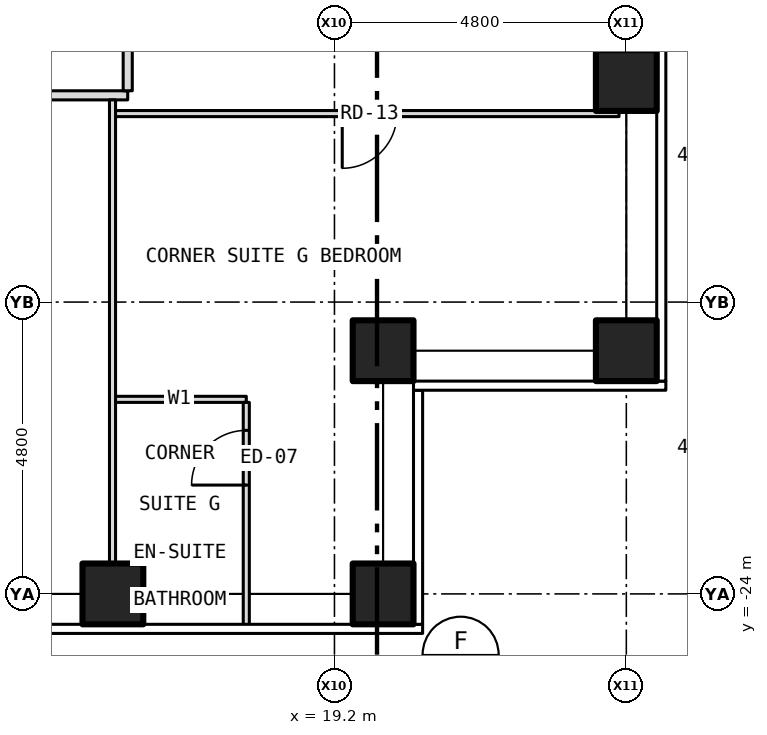
"""IFC4 building model, lengths in metres.
Left out: names, types, materials, properties, quantities, classifications, styles, units other than length and angle.
Written with IfcOpenShell. Run it as: python <this file> out.ifc"""

import sys

from ifc_helpers import new_model, si_unit, direction, frame, frame_2d, origin, origin_2d, place, context, subcontext, project, spatial, rectangle, hollow_rectangle, extrude, element, fill, save


model = new_model("IFC4")
c1 = context("Model", 3, precision=1e-05, world=origin(), true_north=direction((0.0, 1.0)))
c2 = subcontext(c1, "Body", "Model", "MODEL_VIEW")
j1 = project(units=[si_unit("LENGTHUNIT", "METRE"), si_unit("PLANEANGLEUNIT", "RADIAN")], contexts=[c1])
p1 = place(None, origin())
s1 = spatial("IfcSite", under=j1, at=p1, CompositionType="ELEMENT")
p2 = place(p1, origin())
s2 = spatial("IfcBuilding", under=s1, at=p2, CompositionType="ELEMENT")
p3 = place(p2, frame((0.0, 0.0, 70.5)))
s3 = spatial("IfcBuildingStorey", under=s2, at=p3, CompositionType="ELEMENT", Elevation=70.5)
for number, where, z_axis, x_axis in (
    (1, (15.556, -24.0, -0.15), (0.0, 0.0, 1.0), (1.0, 0.0, 0.0)),
    (2, (20.0, -24.0, -0.15), (0.0, 0.0, 1.0), (1.0, 0.0, 0.0)),
    (3, (24.0, -20.0, -0.15), (0.0, 0.0, 1.0), (1.0, 0.0, 0.0)),
    (4, (24.0, -15.556, -0.15), (0.0, 0.0, 1.0), (1.0, 0.0, 0.0)),
    (5, (20.0, -20.0, -0.15), (0.0, 0.0, 1.0), (1.0, 0.0, 0.0)),
):
    element("IfcColumn", number, at=place(p3, frame(where, z_axis=z_axis, x_axis=x_axis)), inside=s3, PredefinedType="COLUMN", context=c2, shape_type="SweptSolid", body=[
        extrude(hollow_rectangle(XDim=1.0, YDim=1.0, WallThickness=0.06, at=origin_2d()), origin(), (0.0, 0.0, 1.0), 3.5),
    ])
p4 = place(p3, frame((15.55, -20.8, 0.0), z_axis=(0.0, 0.0, 1.0), x_axis=(1.0, 0.0, 0.0)))
e6 = element("IfcWall", 6, at=p4, inside=s3, PredefinedType="PARTITIONING", context=c2, shape_type="SweptSolid", body=[
    extrude(rectangle(XDim=2.2, YDim=0.1, at=frame_2d((1.1, 0.0))), origin(), (0.0, 0.0, 1.0), 3.35),
])
p5 = place(p3, frame((15.55, -16.1, 0.0), z_axis=(0.0, 0.0, 1.0), x_axis=(1.0, 0.0, 0.0)))
e7 = element("IfcWall", 7, at=p5, inside=s3, PredefinedType="PARTITIONING", context=c2, shape_type="SweptSolid", body=[
    extrude(rectangle(XDim=8.33, YDim=0.1, at=frame_2d((4.165, 0.0))), origin(), (0.0, 0.0, 1.0), 3.35),
])
p6 = place(p5, frame((3.778, 0.0, 0.0)))
e8 = element("IfcOpeningElement", 8, at=p6, cuts=e7, PredefinedType="OPENING", context=c2, shape_type="SweptSolid", body=[
    extrude(rectangle(XDim=0.9, YDim=2.1, at=frame_2d((0.45, 1.05))), frame((0.0, 0.062, 0.0), z_axis=(0.0, -1.0, 0.0), x_axis=(1.0, 0.0, 0.0)), (0.0, 0.0, 1.0), 0.124),
])
p7 = place(p3, frame((9.15, -15.8, 0.0), z_axis=(0.0, 0.0, 1.0), x_axis=(1.0, 0.0, 0.0)))
e9 = element("IfcWall", 9, at=p7, inside=s3, PredefinedType="PARTITIONING", context=c2, shape_type="SweptSolid", body=[
    extrude(rectangle(XDim=6.65, YDim=0.15, at=frame_2d((3.325, 0.0))), origin(), (0.0, 0.0, 1.0), 3.35),
])
p8 = place(p7, frame((3.803, 0.0, 0.0)))
e10 = element("IfcOpeningElement", 10, at=p8, cuts=e9, PredefinedType="OPENING", context=c2, shape_type="SweptSolid", body=[
    extrude(rectangle(XDim=1.0, YDim=2.1, at=frame_2d((0.5, 1.05))), frame((0.0, 0.087, 0.0), z_axis=(0.0, -1.0, 0.0), x_axis=(1.0, 0.0, 0.0)), (0.0, 0.0, 1.0), 0.174),
])
p9 = place(p3, frame((15.55, -23.88, 0.0), z_axis=(0.0, 0.0, 1.0), x_axis=(0.0, 1.0, 0.0)))
e11 = element("IfcWall", 11, at=p9, inside=s3, PredefinedType="PARTITIONING", context=c2, shape_type="SweptSolid", body=[
    extrude(rectangle(XDim=8.005, YDim=0.1, at=frame_2d((4.002, 0.0))), origin(), (0.0, 0.0, 1.0), 3.35),
])
p10 = place(p3, frame((15.8, -15.725, 0.0), z_axis=(0.0, 0.0, 1.0), x_axis=(0.0, 1.0, 0.0)))
e12 = element("IfcWall", 12, at=p10, inside=s3, PredefinedType="PARTITIONING", context=c2, shape_type="SweptSolid", body=[
    extrude(rectangle(XDim=4.805, YDim=0.15, at=frame_2d((2.403, 0.0))), origin(), (0.0, 0.0, 1.0), 3.35),
])
p11 = place(p10, frame((3.025, 0.0, 0.0)))
e13 = element("IfcOpeningElement", 13, at=p11, cuts=e12, PredefinedType="OPENING", context=c2, shape_type="SweptSolid", body=[
    extrude(rectangle(XDim=1.0, YDim=2.1, at=frame_2d((0.5, 1.05))), frame((0.0, 0.087, 0.0), z_axis=(0.0, -1.0, 0.0), x_axis=(1.0, 0.0, 0.0)), (0.0, 0.0, 1.0), 0.174),
])
p12 = place(p3, frame((17.75, -24.53, 0.0), z_axis=(0.0, 0.0, 1.0), x_axis=(0.0, 1.0, 0.0)))
e14 = element("IfcWall", 14, at=p12, inside=s3, PredefinedType="PARTITIONING", context=c2, shape_type="SweptSolid", body=[
    extrude(rectangle(XDim=3.68, YDim=0.1, at=frame_2d((1.84, 0.0))), origin(), (0.0, 0.0, 1.0), 3.35),
])
p13 = place(p12, frame((2.32, 0.0, 0.0)))
e15 = element("IfcOpeningElement", 15, at=p13, cuts=e14, PredefinedType="OPENING", context=c2, shape_type="SweptSolid", body=[
    extrude(rectangle(XDim=0.9, YDim=2.1, at=frame_2d((0.45, 1.05))), frame((0.0, 0.062, 0.0), z_axis=(0.0, -1.0, 0.0), x_axis=(1.0, 0.0, 0.0)), (0.0, 0.0, 1.0), 0.124),
])
p14 = place(p6, origin())
e16 = element("IfcDoor", 16, at=p14, inside=s3, OperationType="SINGLE_SWING_LEFT", PredefinedType="DOOR", context=c2, shape_type="SweptSolid", body=[
    extrude(rectangle(XDim=0.9, YDim=2.1, at=frame_2d((0.45, 1.05))), frame((0.0, 0.025, 0.0), z_axis=(0.0, -1.0, 0.0), x_axis=(1.0, 0.0, 0.0)), (0.0, 0.0, 1.0), 0.05),
])
fill(e8, e16)
p15 = place(p13, origin())
e17 = element("IfcDoor", 17, at=p15, inside=s3, OperationType="SINGLE_SWING_LEFT", PredefinedType="DOOR", context=c2, shape_type="SweptSolid", body=[
    extrude(rectangle(XDim=0.9, YDim=2.1, at=frame_2d((0.45, 1.05))), frame((0.0, 0.025, 0.0), z_axis=(0.0, -1.0, 0.0), x_axis=(1.0, 0.0, 0.0)), (0.0, 0.0, 1.0), 0.05),
])
fill(e15, e17)
save(model, sys.argv[1])
